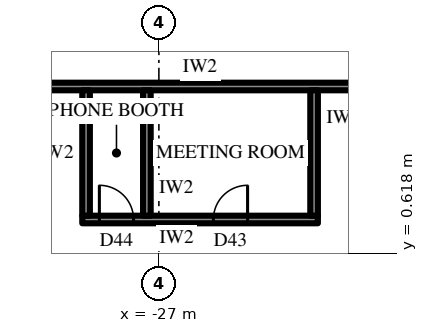
"""IFC4 building model, lengths in metres.
Left out: names, types, materials, properties, quantities, classifications, styles, units other than length and angle.
Written with IfcOpenShell. Run it as: python <this file> out.ifc"""

import sys

from ifc_helpers import new_model, si_unit, direction, frame, frame_2d, origin, place, context, subcontext, project, spatial, rectangle, extrude, element, fill, save


model = new_model("IFC4")
c1 = context("Model", 3, precision=1e-05, world=origin(), true_north=direction((0.0, 1.0)))
c2 = subcontext(c1, "Body", "Model", "MODEL_VIEW")
j1 = project(units=[si_unit("LENGTHUNIT", "METRE"), si_unit("PLANEANGLEUNIT", "RADIAN")], contexts=[c1])
p1 = place(None, origin())
s1 = spatial("IfcSite", under=j1, at=p1, CompositionType="ELEMENT")
p2 = place(p1, origin())
s2 = spatial("IfcBuilding", under=s1, at=p2, CompositionType="ELEMENT")
p3 = place(p2, frame((0.0, 0.0, 199.3)))
s3 = spatial("IfcBuildingStorey", under=s2, at=p3, CompositionType="ELEMENT", Elevation=199.3)
p4 = place(p3, frame((-18.6, 5.0, 0.0), z_axis=(0.0, 0.0, 1.0), x_axis=(-1.0, 0.0, 0.0)))
e1 = element("IfcWall", 1, at=p4, inside=s3, PredefinedType="PARTITIONING", context=c2, shape_type="SweptSolid", body=[
    extrude(rectangle(XDim=14.632, YDim=0.2, at=frame_2d((7.316, 0.0))), origin(), (0.0, 0.0, 1.0), 3.9),
])
p5 = place(p3, frame((-22.816, 1.5, 0.0), z_axis=(0.0, 0.0, 1.0), x_axis=(-1.0, 0.0, 0.0)))
e2 = element("IfcWall", 2, at=p5, inside=s3, PredefinedType="PARTITIONING", context=c2, shape_type="SweptSolid", body=[
    extrude(rectangle(XDim=6.2, YDim=0.2, at=frame_2d((3.1, 0.0))), origin(), (0.0, 0.0, 1.0), 3.9),
])
p6 = place(p5, frame((1.85, 0.0, 0.0)))
e3 = element("IfcOpeningElement", 3, at=p6, cuts=e2, PredefinedType="OPENING", context=c2, shape_type="SweptSolid", body=[
    extrude(rectangle(XDim=0.9, YDim=2.2, at=frame_2d((0.45, 1.1))), frame((0.0, 0.11, 0.0), z_axis=(0.0, -1.0, 0.0), x_axis=(1.0, 0.0, 0.0)), (0.0, 0.0, 1.0), 0.22),
])
p7 = place(p5, frame((4.85, 0.0, 0.0)))
e4 = element("IfcOpeningElement", 4, at=p7, cuts=e2, PredefinedType="OPENING", context=c2, shape_type="SweptSolid", body=[
    extrude(rectangle(XDim=0.9, YDim=2.2, at=frame_2d((0.45, 1.1))), frame((0.0, 0.11, 0.0), z_axis=(0.0, -1.0, 0.0), x_axis=(1.0, 0.0, 0.0)), (0.0, 0.0, 1.0), 0.22),
])
for number, where, z_axis, x_axis in (
    (5, (-22.916, 4.9, 0.0), (0.0, 0.0, 1.0), (0.0, -1.0, 0.0)),
    (6, (-27.316, 4.9, 0.0), (0.0, 0.0, 1.0), (0.0, -1.0, 0.0)),
    (7, (-28.916, 4.9, 0.0), (0.0, 0.0, 1.0), (0.0, -1.0, 0.0)),
):
    element("IfcWall", number, at=place(p3, frame(where, z_axis=z_axis, x_axis=x_axis)), inside=s3, PredefinedType="PARTITIONING", context=c2, shape_type="SweptSolid", body=[
        extrude(rectangle(XDim=3.3, YDim=0.2, at=frame_2d((1.65, 0.0))), origin(), (0.0, 0.0, 1.0), 3.9),
    ])
p8 = place(p6, frame((0.9, 0.0, 0.0), z_axis=(0.0, 0.0, 1.0), x_axis=(-1.0, 0.0, 0.0)))
e8 = element("IfcDoor", 8, at=p8, inside=s3, OperationType="SINGLE_SWING_LEFT", PredefinedType="DOOR", context=c2, shape_type="SweptSolid", body=[
    extrude(rectangle(XDim=0.9, YDim=2.2, at=frame_2d((0.45, 1.1))), frame((0.0, 0.025, 0.0), z_axis=(0.0, -1.0, 0.0), x_axis=(1.0, 0.0, 0.0)), (0.0, 0.0, 1.0), 0.05),
])
fill(e3, e8)
p9 = place(p7, frame((0.9, 0.0, 0.0), z_axis=(0.0, 0.0, 1.0), x_axis=(-1.0, 0.0, 0.0)))
e9 = element("IfcDoor", 9, at=p9, inside=s3, OperationType="SINGLE_SWING_RIGHT", PredefinedType="DOOR", context=c2, shape_type="SweptSolid", body=[
    extrude(rectangle(XDim=0.9, YDim=2.2, at=frame_2d((0.45, 1.1))), frame((0.0, 0.025, 0.0), z_axis=(0.0, -1.0, 0.0), x_axis=(1.0, 0.0, 0.0)), (0.0, 0.0, 1.0), 0.05),
])
fill(e4, e9)
save(model, sys.argv[1])
